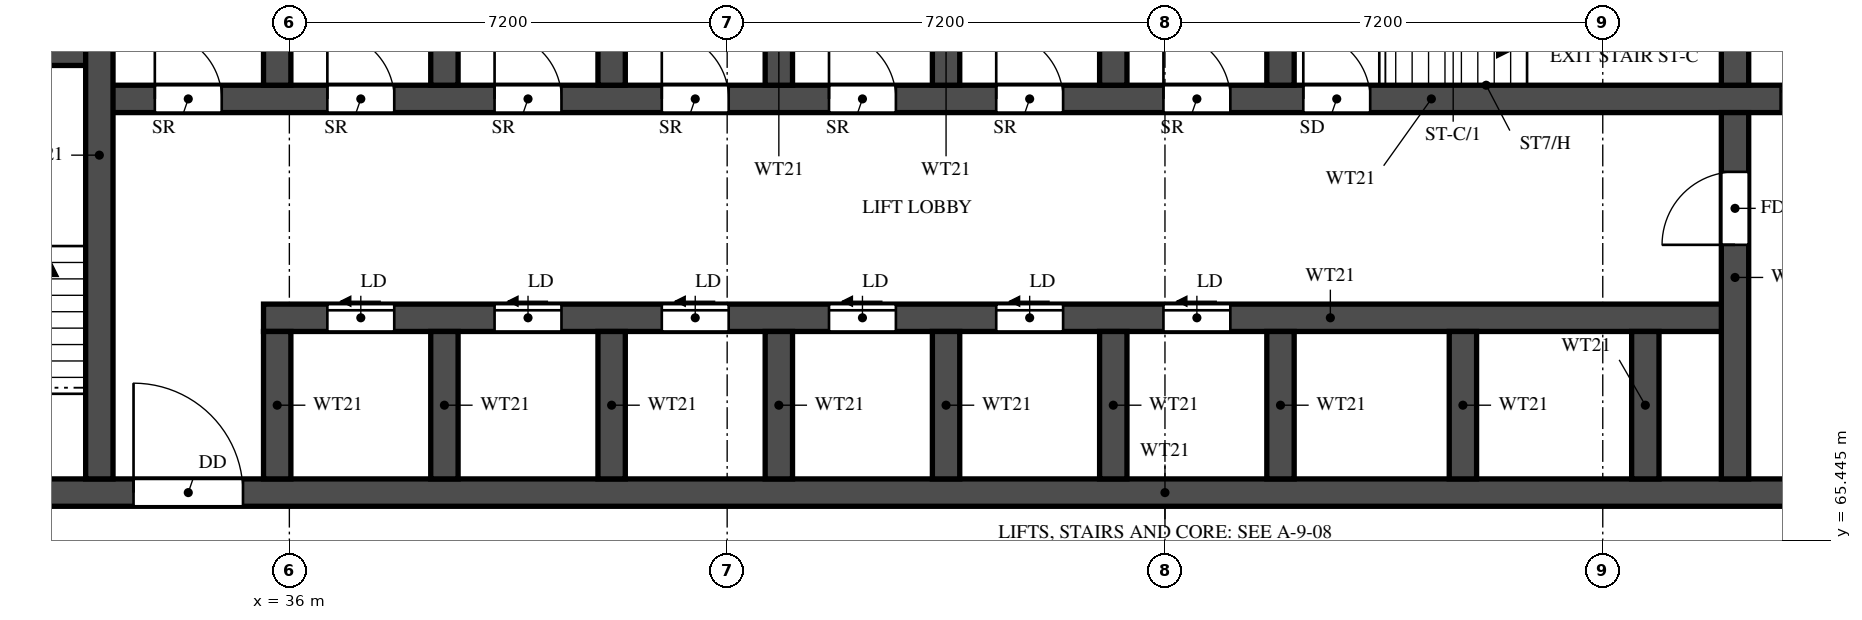
"""IFC4 building model, lengths in metres.
Left out: names, types, materials, properties, quantities, classifications, styles, units other than length and angle.
Written with IfcOpenShell. Run it as: python <this file> out.ifc"""

import sys

from ifc_helpers import new_model, si_unit, direction, frame, frame_2d, origin, place, context, subcontext, project, spatial, rectangle, extrude, element, fill, save


model = new_model("IFC4")
c1 = context("Model", 3, precision=1e-05, world=origin(), true_north=direction((0.0, 1.0)))
c2 = subcontext(c1, "Body", "Model", "MODEL_VIEW")
j1 = project(units=[si_unit("LENGTHUNIT", "METRE"), si_unit("PLANEANGLEUNIT", "RADIAN")], contexts=[c1])
p1 = place(None, origin())
s1 = spatial("IfcSite", under=j1, at=p1, CompositionType="ELEMENT")
p2 = place(p1, origin())
s2 = spatial("IfcBuilding", under=s1, at=p2, CompositionType="ELEMENT")
p3 = place(p2, frame((0.0, 0.0, 37.5)))
s3 = spatial("IfcBuildingStorey", under=s2, at=p3, CompositionType="ELEMENT", Elevation=37.5)
p4 = place(p3, frame((29.7, 66.225, 0.0), z_axis=(0.0, 0.0, 1.0), x_axis=(1.0, 0.0, 0.0)))
e1 = element("IfcWall", 1, at=p4, inside=s3, PredefinedType="SHEAR", context=c2, shape_type="SweptSolid", body=[
    extrude(rectangle(XDim=41.4, YDim=0.45, at=frame_2d((20.7, 0.0))), origin(), (0.0, 0.0, 1.0), 3.18),
])
p5 = place(p4, frame((0.925, 0.0, 0.0)))
e2 = element("IfcOpeningElement", 2, at=p5, cuts=e1, PredefinedType="OPENING", context=c2, shape_type="SweptSolid", body=[
    extrude(rectangle(XDim=1.1, YDim=2.1, at=frame_2d((0.55, 1.05))), frame((0.0, 0.235, 0.0), z_axis=(0.0, -1.0, 0.0), x_axis=(1.0, 0.0, 0.0)), (0.0, 0.0, 1.0), 0.47),
])
p6 = place(p4, frame((3.738, 0.0, 0.0)))
e3 = element("IfcOpeningElement", 3, at=p6, cuts=e1, PredefinedType="OPENING", context=c2, shape_type="SweptSolid", body=[
    extrude(rectangle(XDim=1.8, YDim=2.1, at=frame_2d((0.9, 1.05))), frame((0.0, 0.235, 0.0), z_axis=(0.0, -1.0, 0.0), x_axis=(1.0, 0.0, 0.0)), (0.0, 0.0, 1.0), 0.47),
])
p7 = place(p3, frame((35.575, 69.1, 0.0), z_axis=(0.0, 0.0, 1.0), x_axis=(1.0, 0.0, 0.0)))
e4 = element("IfcWall", 4, at=p7, inside=s3, PredefinedType="SHEAR", context=c2, shape_type="SweptSolid", body=[
    extrude(rectangle(XDim=24.2, YDim=0.45, at=frame_2d((12.1, 0.0))), origin(), (0.0, 0.0, 1.0), 3.18),
])
p8 = place(p7, frame((1.05, 0.0, 0.0)))
e5 = element("IfcOpeningElement", 5, at=p8, cuts=e4, PredefinedType="OPENING", context=c2, shape_type="SweptSolid", body=[
    extrude(rectangle(XDim=1.1, YDim=2.1, at=frame_2d((0.55, 1.05))), frame((0.0, 0.235, 0.0), z_axis=(0.0, -1.0, 0.0), x_axis=(1.0, 0.0, 0.0)), (0.0, 0.0, 1.0), 0.47),
])
p9 = place(p7, frame((3.8, 0.0, 0.0)))
e6 = element("IfcOpeningElement", 6, at=p9, cuts=e4, PredefinedType="OPENING", context=c2, shape_type="SweptSolid", body=[
    extrude(rectangle(XDim=1.1, YDim=2.1, at=frame_2d((0.55, 1.05))), frame((0.0, 0.235, 0.0), z_axis=(0.0, -1.0, 0.0), x_axis=(1.0, 0.0, 0.0)), (0.0, 0.0, 1.0), 0.47),
])
p10 = place(p7, frame((6.55, 0.0, 0.0)))
e7 = element("IfcOpeningElement", 7, at=p10, cuts=e4, PredefinedType="OPENING", context=c2, shape_type="SweptSolid", body=[
    extrude(rectangle(XDim=1.1, YDim=2.1, at=frame_2d((0.55, 1.05))), frame((0.0, 0.235, 0.0), z_axis=(0.0, -1.0, 0.0), x_axis=(1.0, 0.0, 0.0)), (0.0, 0.0, 1.0), 0.47),
])
p11 = place(p7, frame((9.3, 0.0, 0.0)))
e8 = element("IfcOpeningElement", 8, at=p11, cuts=e4, PredefinedType="OPENING", context=c2, shape_type="SweptSolid", body=[
    extrude(rectangle(XDim=1.1, YDim=2.1, at=frame_2d((0.55, 1.05))), frame((0.0, 0.235, 0.0), z_axis=(0.0, -1.0, 0.0), x_axis=(1.0, 0.0, 0.0)), (0.0, 0.0, 1.0), 0.47),
])
p12 = place(p7, frame((12.05, 0.0, 0.0)))
e9 = element("IfcOpeningElement", 9, at=p12, cuts=e4, PredefinedType="OPENING", context=c2, shape_type="SweptSolid", body=[
    extrude(rectangle(XDim=1.1, YDim=2.1, at=frame_2d((0.55, 1.05))), frame((0.0, 0.235, 0.0), z_axis=(0.0, -1.0, 0.0), x_axis=(1.0, 0.0, 0.0)), (0.0, 0.0, 1.0), 0.47),
])
p13 = place(p7, frame((14.8, 0.0, 0.0)))
e10 = element("IfcOpeningElement", 10, at=p13, cuts=e4, PredefinedType="OPENING", context=c2, shape_type="SweptSolid", body=[
    extrude(rectangle(XDim=1.1, YDim=2.1, at=frame_2d((0.55, 1.05))), frame((0.0, 0.235, 0.0), z_axis=(0.0, -1.0, 0.0), x_axis=(1.0, 0.0, 0.0)), (0.0, 0.0, 1.0), 0.47),
])
p14 = place(p3, frame((32.875, 72.7, 0.0), z_axis=(0.0, 0.0, 1.0), x_axis=(1.0, 0.0, 0.0)))
e11 = element("IfcWall", 11, at=p14, inside=s3, PredefinedType="SHEAR", context=c2, shape_type="SweptSolid", body=[
    extrude(rectangle(XDim=35.05, YDim=0.45, at=frame_2d((17.525, 0.0))), origin(), (0.0, 0.0, 1.0), 3.18),
])
p15 = place(p14, frame((19.8, 0.0, 0.0)))
e12 = element("IfcOpeningElement", 12, at=p15, cuts=e11, PredefinedType="OPENING", context=c2, shape_type="SweptSolid", body=[
    extrude(rectangle(XDim=1.1, YDim=2.1, at=frame_2d((0.55, 1.05))), frame((0.0, 0.235, 0.0), z_axis=(0.0, -1.0, 0.0), x_axis=(1.0, 0.0, 0.0)), (0.0, 0.0, 1.0), 0.47),
])
p16 = place(p14, frame((27.65, 0.0, 0.0)))
e13 = element("IfcOpeningElement", 13, at=p16, cuts=e11, PredefinedType="OPENING", context=c2, shape_type="SweptSolid", body=[
    extrude(rectangle(XDim=1.1, YDim=2.1, at=frame_2d((0.55, 1.05))), frame((0.0, 0.235, 0.0), z_axis=(0.0, -1.0, 0.0), x_axis=(1.0, 0.0, 0.0)), (0.0, 0.0, 1.0), 0.47),
])
p17 = place(p14, frame((30.25, 0.0, 0.0)))
e14 = element("IfcOpeningElement", 14, at=p17, cuts=e11, PredefinedType="OPENING", context=c2, shape_type="SweptSolid", body=[
    extrude(rectangle(XDim=1.1, YDim=2.1, at=frame_2d((0.55, 1.05))), frame((0.0, 0.235, 0.0), z_axis=(0.0, -1.0, 0.0), x_axis=(1.0, 0.0, 0.0)), (0.0, 0.0, 1.0), 0.47),
])
p18 = place(p14, frame((3.75, 0.0, 0.0)))
e15 = element("IfcOpeningElement", 15, at=p18, cuts=e11, PredefinedType="OPENING", context=c2, shape_type="SweptSolid", body=[
    extrude(rectangle(XDim=1.1, YDim=2.1, at=frame_2d((0.55, 1.05))), frame((0.0, 0.235, 0.0), z_axis=(0.0, -1.0, 0.0), x_axis=(1.0, 0.0, 0.0)), (0.0, 0.0, 1.0), 0.47),
])
p19 = place(p14, frame((6.5, 0.0, 0.0)))
e16 = element("IfcOpeningElement", 16, at=p19, cuts=e11, PredefinedType="OPENING", context=c2, shape_type="SweptSolid", body=[
    extrude(rectangle(XDim=1.1, YDim=2.1, at=frame_2d((0.55, 1.05))), frame((0.0, 0.235, 0.0), z_axis=(0.0, -1.0, 0.0), x_axis=(1.0, 0.0, 0.0)), (0.0, 0.0, 1.0), 0.47),
])
p20 = place(p14, frame((9.25, 0.0, 0.0)))
e17 = element("IfcOpeningElement", 17, at=p20, cuts=e11, PredefinedType="OPENING", context=c2, shape_type="SweptSolid", body=[
    extrude(rectangle(XDim=1.1, YDim=2.1, at=frame_2d((0.55, 1.05))), frame((0.0, 0.235, 0.0), z_axis=(0.0, -1.0, 0.0), x_axis=(1.0, 0.0, 0.0)), (0.0, 0.0, 1.0), 0.47),
])
p21 = place(p14, frame((12.0, 0.0, 0.0)))
e18 = element("IfcOpeningElement", 18, at=p21, cuts=e11, PredefinedType="OPENING", context=c2, shape_type="SweptSolid", body=[
    extrude(rectangle(XDim=1.1, YDim=2.1, at=frame_2d((0.55, 1.05))), frame((0.0, 0.235, 0.0), z_axis=(0.0, -1.0, 0.0), x_axis=(1.0, 0.0, 0.0)), (0.0, 0.0, 1.0), 0.47),
])
p22 = place(p14, frame((14.75, 0.0, 0.0)))
e19 = element("IfcOpeningElement", 19, at=p22, cuts=e11, PredefinedType="OPENING", context=c2, shape_type="SweptSolid", body=[
    extrude(rectangle(XDim=1.1, YDim=2.1, at=frame_2d((0.55, 1.05))), frame((0.0, 0.235, 0.0), z_axis=(0.0, -1.0, 0.0), x_axis=(1.0, 0.0, 0.0)), (0.0, 0.0, 1.0), 0.47),
])
p23 = place(p14, frame((17.5, 0.0, 0.0)))
e20 = element("IfcOpeningElement", 20, at=p23, cuts=e11, PredefinedType="OPENING", context=c2, shape_type="SweptSolid", body=[
    extrude(rectangle(XDim=1.1, YDim=2.1, at=frame_2d((0.55, 1.05))), frame((0.0, 0.235, 0.0), z_axis=(0.0, -1.0, 0.0), x_axis=(1.0, 0.0, 0.0)), (0.0, 0.0, 1.0), 0.47),
])
p24 = place(p14, frame((0.913, 0.0, 0.0)))
e21 = element("IfcOpeningElement", 21, at=p24, cuts=e11, PredefinedType="OPENING", context=c2, shape_type="SweptSolid", body=[
    extrude(rectangle(XDim=1.1, YDim=2.1, at=frame_2d((0.55, 1.05))), frame((0.0, 0.235, 0.0), z_axis=(0.0, -1.0, 0.0), x_axis=(1.0, 0.0, 0.0)), (0.0, 0.0, 1.0), 0.47),
])
p25 = place(p3, frame((29.7, 73.475, 0.0), z_axis=(0.0, 0.0, 1.0), x_axis=(1.0, 0.0, 0.0)))
e22 = element("IfcWall", 22, at=p25, inside=s3, PredefinedType="SHEAR", context=c2, shape_type="SweptSolid", body=[
    extrude(rectangle(XDim=3.175, YDim=0.45, at=frame_2d((1.587, 0.0))), origin(), (0.0, 0.0, 1.0), 3.18),
])
p26 = place(p3, frame((32.875, 66.45, 0.0), z_axis=(0.0, 0.0, 1.0), x_axis=(0.0, 1.0, 0.0)))
e23 = element("IfcWall", 23, at=p26, inside=s3, PredefinedType="SHEAR", context=c2, shape_type="SweptSolid", body=[
    extrude(rectangle(XDim=10.65, YDim=0.45, at=frame_2d((5.325, 0.0))), origin(), (0.0, 0.0, 1.0), 3.18),
])
p27 = place(p3, frame((59.775, 66.45, 0.0), z_axis=(0.0, 0.0, 1.0), x_axis=(0.0, 1.0, 0.0)))
e24 = element("IfcWall", 24, at=p27, inside=s3, PredefinedType="SHEAR", context=c2, shape_type="SweptSolid", body=[
    extrude(rectangle(XDim=6.025, YDim=0.45, at=frame_2d((3.013, 0.0))), origin(), (0.0, 0.0, 1.0), 3.18),
])
p28 = place(p27, frame((3.85, 0.0, 0.0)))
e25 = element("IfcOpeningElement", 25, at=p28, cuts=e24, PredefinedType="OPENING", context=c2, shape_type="SweptSolid", body=[
    extrude(rectangle(XDim=1.2, YDim=2.1, at=frame_2d((0.6, 1.05))), frame((0.0, 0.235, 0.0), z_axis=(0.0, -1.0, 0.0), x_axis=(1.0, 0.0, 0.0)), (0.0, 0.0, 1.0), 0.47),
])
p29 = place(p3, frame((59.775, 72.925, 0.0), z_axis=(0.0, 0.0, 1.0), x_axis=(0.0, 1.0, 0.0)))
e26 = element("IfcWall", 26, at=p29, inside=s3, PredefinedType="SHEAR", context=c2, shape_type="SweptSolid", body=[
    extrude(rectangle(XDim=2.95, YDim=0.45, at=frame_2d((1.475, 0.0))), origin(), (0.0, 0.0, 1.0), 3.18),
])
for number, where, z_axis, x_axis in (
    (27, (35.8, 66.45, 0.0), (0.0, 0.0, 1.0), (0.0, 1.0, 0.0)),
    (28, (38.55, 66.45, 0.0), (0.0, 0.0, 1.0), (0.0, 1.0, 0.0)),
    (29, (41.3, 66.45, 0.0), (0.0, 0.0, 1.0), (0.0, 1.0, 0.0)),
    (30, (44.05, 66.45, 0.0), (0.0, 0.0, 1.0), (0.0, 1.0, 0.0)),
    (31, (46.8, 66.45, 0.0), (0.0, 0.0, 1.0), (0.0, 1.0, 0.0)),
    (32, (49.55, 66.45, 0.0), (0.0, 0.0, 1.0), (0.0, 1.0, 0.0)),
    (33, (52.3, 66.45, 0.0), (0.0, 0.0, 1.0), (0.0, 1.0, 0.0)),
    (34, (55.3, 66.45, 0.0), (0.0, 0.0, 1.0), (0.0, 1.0, 0.0)),
    (35, (58.3, 66.45, 0.0), (0.0, 0.0, 1.0), (0.0, 1.0, 0.0)),
):
    element("IfcWall", number, at=place(p3, frame(where, z_axis=z_axis, x_axis=x_axis)), inside=s3, PredefinedType="SHEAR", context=c2, shape_type="SweptSolid", body=[
        extrude(rectangle(XDim=2.425, YDim=0.45, at=frame_2d((1.212, 0.0))), origin(), (0.0, 0.0, 1.0), 3.18),
    ])
for number, where, z_axis, x_axis in (
    (36, (35.8, 72.925, 0.0), (0.0, 0.0, 1.0), (0.0, 1.0, 0.0)),
    (37, (38.55, 72.925, 0.0), (0.0, 0.0, 1.0), (0.0, 1.0, 0.0)),
    (38, (41.3, 72.925, 0.0), (0.0, 0.0, 1.0), (0.0, 1.0, 0.0)),
    (39, (44.05, 72.925, 0.0), (0.0, 0.0, 1.0), (0.0, 1.0, 0.0)),
    (40, (46.8, 72.925, 0.0), (0.0, 0.0, 1.0), (0.0, 1.0, 0.0)),
    (41, (49.55, 72.925, 0.0), (0.0, 0.0, 1.0), (0.0, 1.0, 0.0)),
    (42, (52.3, 72.925, 0.0), (0.0, 0.0, 1.0), (0.0, 1.0, 0.0)),
):
    element("IfcWall", number, at=place(p3, frame(where, z_axis=z_axis, x_axis=x_axis)), inside=s3, PredefinedType="SHEAR", context=c2, shape_type="SweptSolid", body=[
        extrude(rectangle(XDim=2.95, YDim=0.45, at=frame_2d((1.475, 0.0))), origin(), (0.0, 0.0, 1.0), 3.18),
    ])
p30 = place(p15, origin())
e43 = element("IfcDoor", 43, at=p30, inside=s3, OperationType="SINGLE_SWING_LEFT", PredefinedType="DOOR", context=c2, shape_type="SweptSolid", body=[
    extrude(rectangle(XDim=1.1, YDim=2.1, at=frame_2d((0.55, 1.05))), frame((0.0, 0.025, 0.0), z_axis=(0.0, -1.0, 0.0), x_axis=(1.0, 0.0, 0.0)), (0.0, 0.0, 1.0), 0.05),
])
fill(e12, e43)
p31 = place(p6, origin())
e44 = element("IfcDoor", 44, at=p31, inside=s3, OperationType="DOUBLE_DOOR_SINGLE_SWING", PredefinedType="DOOR", context=c2, shape_type="SweptSolid", body=[
    extrude(rectangle(XDim=1.8, YDim=2.1, at=frame_2d((0.9, 1.05))), frame((0.0, 0.025, 0.0), z_axis=(0.0, -1.0, 0.0), x_axis=(1.0, 0.0, 0.0)), (0.0, 0.0, 1.0), 0.05),
])
fill(e3, e44)
p32 = place(p28, origin())
e45 = element("IfcDoor", 45, at=p32, inside=s3, OperationType="SINGLE_SWING_RIGHT", PredefinedType="DOOR", context=c2, shape_type="SweptSolid", body=[
    extrude(rectangle(XDim=1.2, YDim=2.1, at=frame_2d((0.6, 1.05))), frame((0.0, 0.025, 0.0), z_axis=(0.0, -1.0, 0.0), x_axis=(1.0, 0.0, 0.0)), (0.0, 0.0, 1.0), 0.05),
])
fill(e25, e45)
p33 = place(p16, origin())
e46 = element("IfcDoor", 46, at=p33, inside=s3, OperationType="SLIDING_TO_LEFT", PredefinedType="DOOR", context=c2, shape_type="SweptSolid", body=[
    extrude(rectangle(XDim=1.1, YDim=2.1, at=frame_2d((0.55, 1.05))), frame((0.0, 0.025, 0.0), z_axis=(0.0, -1.0, 0.0), x_axis=(1.0, 0.0, 0.0)), (0.0, 0.0, 1.0), 0.05),
])
fill(e13, e46)
p34 = place(p8, origin())
e47 = element("IfcDoor", 47, at=p34, inside=s3, OperationType="SLIDING_TO_LEFT", PredefinedType="DOOR", context=c2, shape_type="SweptSolid", body=[
    extrude(rectangle(XDim=1.1, YDim=2.1, at=frame_2d((0.55, 1.05))), frame((0.0, 0.025, 0.0), z_axis=(0.0, -1.0, 0.0), x_axis=(1.0, 0.0, 0.0)), (0.0, 0.0, 1.0), 0.05),
])
fill(e5, e47)
p35 = place(p9, origin())
e48 = element("IfcDoor", 48, at=p35, inside=s3, OperationType="SLIDING_TO_LEFT", PredefinedType="DOOR", context=c2, shape_type="SweptSolid", body=[
    extrude(rectangle(XDim=1.1, YDim=2.1, at=frame_2d((0.55, 1.05))), frame((0.0, 0.025, 0.0), z_axis=(0.0, -1.0, 0.0), x_axis=(1.0, 0.0, 0.0)), (0.0, 0.0, 1.0), 0.05),
])
fill(e6, e48)
p36 = place(p10, origin())
e49 = element("IfcDoor", 49, at=p36, inside=s3, OperationType="SLIDING_TO_LEFT", PredefinedType="DOOR", context=c2, shape_type="SweptSolid", body=[
    extrude(rectangle(XDim=1.1, YDim=2.1, at=frame_2d((0.55, 1.05))), frame((0.0, 0.025, 0.0), z_axis=(0.0, -1.0, 0.0), x_axis=(1.0, 0.0, 0.0)), (0.0, 0.0, 1.0), 0.05),
])
fill(e7, e49)
p37 = place(p11, origin())
e50 = element("IfcDoor", 50, at=p37, inside=s3, OperationType="SLIDING_TO_LEFT", PredefinedType="DOOR", context=c2, shape_type="SweptSolid", body=[
    extrude(rectangle(XDim=1.1, YDim=2.1, at=frame_2d((0.55, 1.05))), frame((0.0, 0.025, 0.0), z_axis=(0.0, -1.0, 0.0), x_axis=(1.0, 0.0, 0.0)), (0.0, 0.0, 1.0), 0.05),
])
fill(e8, e50)
p38 = place(p12, origin())
e51 = element("IfcDoor", 51, at=p38, inside=s3, OperationType="SLIDING_TO_LEFT", PredefinedType="DOOR", context=c2, shape_type="SweptSolid", body=[
    extrude(rectangle(XDim=1.1, YDim=2.1, at=frame_2d((0.55, 1.05))), frame((0.0, 0.025, 0.0), z_axis=(0.0, -1.0, 0.0), x_axis=(1.0, 0.0, 0.0)), (0.0, 0.0, 1.0), 0.05),
])
fill(e9, e51)
p39 = place(p13, origin())
e52 = element("IfcDoor", 52, at=p39, inside=s3, OperationType="SLIDING_TO_LEFT", PredefinedType="DOOR", context=c2, shape_type="SweptSolid", body=[
    extrude(rectangle(XDim=1.1, YDim=2.1, at=frame_2d((0.55, 1.05))), frame((0.0, 0.025, 0.0), z_axis=(0.0, -1.0, 0.0), x_axis=(1.0, 0.0, 0.0)), (0.0, 0.0, 1.0), 0.05),
])
fill(e10, e52)
p40 = place(p18, origin())
e53 = element("IfcDoor", 53, at=p40, inside=s3, OperationType="SINGLE_SWING_LEFT", PredefinedType="DOOR", context=c2, shape_type="SweptSolid", body=[
    extrude(rectangle(XDim=1.1, YDim=2.1, at=frame_2d((0.55, 1.05))), frame((0.0, 0.025, 0.0), z_axis=(0.0, -1.0, 0.0), x_axis=(1.0, 0.0, 0.0)), (0.0, 0.0, 1.0), 0.05),
])
fill(e15, e53)
p41 = place(p19, origin())
e54 = element("IfcDoor", 54, at=p41, inside=s3, OperationType="SINGLE_SWING_LEFT", PredefinedType="DOOR", context=c2, shape_type="SweptSolid", body=[
    extrude(rectangle(XDim=1.1, YDim=2.1, at=frame_2d((0.55, 1.05))), frame((0.0, 0.025, 0.0), z_axis=(0.0, -1.0, 0.0), x_axis=(1.0, 0.0, 0.0)), (0.0, 0.0, 1.0), 0.05),
])
fill(e16, e54)
p42 = place(p20, origin())
e55 = element("IfcDoor", 55, at=p42, inside=s3, OperationType="SINGLE_SWING_LEFT", PredefinedType="DOOR", context=c2, shape_type="SweptSolid", body=[
    extrude(rectangle(XDim=1.1, YDim=2.1, at=frame_2d((0.55, 1.05))), frame((0.0, 0.025, 0.0), z_axis=(0.0, -1.0, 0.0), x_axis=(1.0, 0.0, 0.0)), (0.0, 0.0, 1.0), 0.05),
])
fill(e17, e55)
p43 = place(p21, origin())
e56 = element("IfcDoor", 56, at=p43, inside=s3, OperationType="SINGLE_SWING_LEFT", PredefinedType="DOOR", context=c2, shape_type="SweptSolid", body=[
    extrude(rectangle(XDim=1.1, YDim=2.1, at=frame_2d((0.55, 1.05))), frame((0.0, 0.025, 0.0), z_axis=(0.0, -1.0, 0.0), x_axis=(1.0, 0.0, 0.0)), (0.0, 0.0, 1.0), 0.05),
])
fill(e18, e56)
p44 = place(p22, origin())
e57 = element("IfcDoor", 57, at=p44, inside=s3, OperationType="SINGLE_SWING_LEFT", PredefinedType="DOOR", context=c2, shape_type="SweptSolid", body=[
    extrude(rectangle(XDim=1.1, YDim=2.1, at=frame_2d((0.55, 1.05))), frame((0.0, 0.025, 0.0), z_axis=(0.0, -1.0, 0.0), x_axis=(1.0, 0.0, 0.0)), (0.0, 0.0, 1.0), 0.05),
])
fill(e19, e57)
p45 = place(p23, origin())
e58 = element("IfcDoor", 58, at=p45, inside=s3, OperationType="SINGLE_SWING_LEFT", PredefinedType="DOOR", context=c2, shape_type="SweptSolid", body=[
    extrude(rectangle(XDim=1.1, YDim=2.1, at=frame_2d((0.55, 1.05))), frame((0.0, 0.025, 0.0), z_axis=(0.0, -1.0, 0.0), x_axis=(1.0, 0.0, 0.0)), (0.0, 0.0, 1.0), 0.05),
])
fill(e20, e58)
p46 = place(p24, origin())
e59 = element("IfcDoor", 59, at=p46, inside=s3, OperationType="SINGLE_SWING_LEFT", PredefinedType="DOOR", context=c2, shape_type="SweptSolid", body=[
    extrude(rectangle(XDim=1.1, YDim=2.1, at=frame_2d((0.55, 1.05))), frame((0.0, 0.025, 0.0), z_axis=(0.0, -1.0, 0.0), x_axis=(1.0, 0.0, 0.0)), (0.0, 0.0, 1.0), 0.05),
])
fill(e21, e59)
save(model, sys.argv[1])
